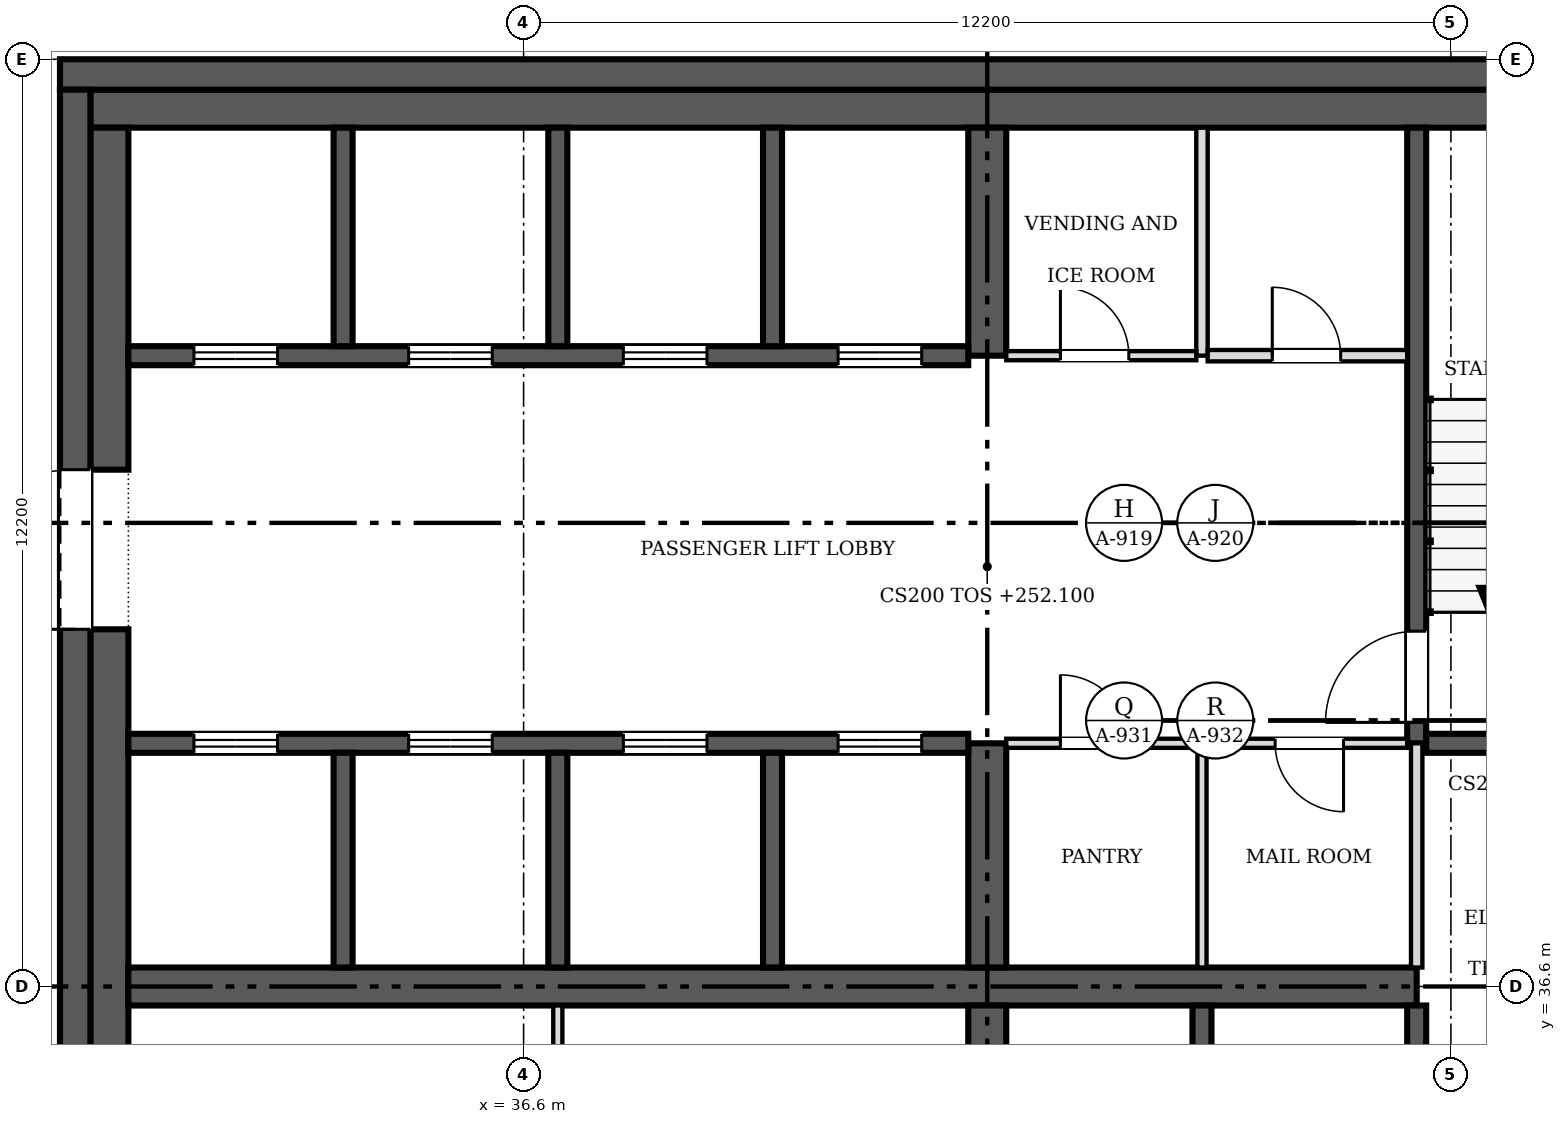
"""IFC4 building model, lengths in metres.
Left out: names, types, materials, properties, quantities, classifications, styles, units other than length and angle.
Written with IfcOpenShell. Run it as: python <this file> out.ifc"""

import sys

from ifc_helpers import new_model, si_unit, direction, frame, frame_2d, origin, place, context, subcontext, project, spatial, rectangle, extrude, source, transform, mapped, element, fill, save


model = new_model("IFC4")
c1 = context("Model", 3, precision=1e-05, world=origin(), true_north=direction((0.0, 1.0)))
c2 = subcontext(c1, "Body", "Model", "MODEL_VIEW")
j1 = project(units=[si_unit("LENGTHUNIT", "METRE"), si_unit("PLANEANGLEUNIT", "RADIAN")], contexts=[c1])
p1 = place(None, origin())
s1 = spatial("IfcSite", under=j1, at=p1, CompositionType="ELEMENT")
p2 = place(p1, origin())
s2 = spatial("IfcBuilding", under=s1, at=p2, CompositionType="ELEMENT")
p3 = place(p2, frame((0.0, 0.0, 252.1)))
s3 = spatial("IfcBuildingStorey", under=s2, at=p3, CompositionType="ELEMENT", Elevation=252.1)
p4 = place(p3, frame((30.7, 24.8, 0.0), z_axis=(0.0, 0.0, 1.0), x_axis=(0.0, 1.0, 0.0)))
e1 = element("IfcWall", 1, at=p4, inside=s3, PredefinedType="SHEAR", context=c2, shape_type="SweptSolid", body=[
    extrude(rectangle(XDim=23.6, YDim=0.4, at=frame_2d((11.8, 0.0))), origin(), (0.0, 0.0, 1.0), 3.8),
])
m1 = source(origin(), c2, "Body", "SweptSolid", [
    extrude(rectangle(XDim=2.1, YDim=2.4, at=frame_2d((1.05, 1.2))), frame((0.0, 0.21, 0.0), z_axis=(0.0, -1.0, 0.0), x_axis=(1.0, 0.0, 0.0)), (0.0, 0.0, 1.0), 0.42),
])
p5 = place(p4, frame((5.0, 0.0, 0.0)))
e2 = element("IfcOpeningElement", 2, at=p5, cuts=e1, PredefinedType="OPENING", context=c2, shape_type="MappedRepresentation", body=[
    mapped(m1, transform((0.0, 0.0, 0.0), scale=1.0)),
])
p6 = place(p4, frame((16.5, 0.0, 0.0)))
e3 = element("IfcOpeningElement", 3, at=p6, cuts=e1, PredefinedType="OPENING", context=c2, shape_type="MappedRepresentation", body=[
    mapped(m1, transform((0.0, 0.0, 0.0), scale=1.0)),
])
p7 = place(p3, frame((30.5, 48.6, 0.0), z_axis=(0.0, 0.0, 1.0), x_axis=(1.0, 0.0, 0.0)))
e4 = element("IfcWall", 4, at=p7, inside=s3, PredefinedType="SHEAR", context=c2, shape_type="SweptSolid", body=[
    extrude(rectangle(XDim=24.4, YDim=0.4, at=frame_2d((12.2, 0.0))), origin(), (0.0, 0.0, 1.0), 3.8),
])
p8 = place(p3, frame((30.9, 48.15, 0.0), z_axis=(0.0, 0.0, 1.0), x_axis=(1.0, 0.0, 0.0)))
e5 = element("IfcWall", 5, at=p8, inside=s3, PredefinedType="SOLIDWALL", context=c2, shape_type="SweptSolid", body=[
    extrude(rectangle(XDim=23.6, YDim=0.5, at=frame_2d((11.8, 0.0))), origin(), (0.0, 0.0, 1.0), 3.8),
])
p9 = place(p3, frame((31.15, 31.9, 0.0), z_axis=(0.0, 0.0, 1.0), x_axis=(0.0, 1.0, 0.0)))
e6 = element("IfcWall", 6, at=p9, inside=s3, PredefinedType="SOLIDWALL", context=c2, shape_type="SweptSolid", body=[
    extrude(rectangle(XDim=9.4, YDim=0.5, at=frame_2d((4.7, 0.0))), origin(), (0.0, 0.0, 1.0), 3.8),
])
p10 = place(p3, frame((31.15, 43.4, 0.0), z_axis=(0.0, 0.0, 1.0), x_axis=(0.0, 1.0, 0.0)))
e7 = element("IfcWall", 7, at=p10, inside=s3, PredefinedType="SOLIDWALL", context=c2, shape_type="SweptSolid", body=[
    extrude(rectangle(XDim=4.5, YDim=0.5, at=frame_2d((2.25, 0.0))), origin(), (0.0, 0.0, 1.0), 3.8),
])
p11 = place(p3, frame((31.4, 36.6, 0.0), z_axis=(0.0, 0.0, 1.0), x_axis=(1.0, 0.0, 0.0)))
e8 = element("IfcWall", 8, at=p11, inside=s3, PredefinedType="SHEAR", context=c2, shape_type="SweptSolid", body=[
    extrude(rectangle(XDim=16.95, YDim=0.5, at=frame_2d((8.475, 0.0))), origin(), (0.0, 0.0, 1.0), 3.8),
])
p12 = place(p3, frame((42.7, 36.35, 0.0), z_axis=(0.0, 0.0, 1.0), x_axis=(0.0, -1.0, 0.0)))
e9 = element("IfcWall", 9, at=p12, inside=s3, PredefinedType="SHEAR", context=c2, shape_type="SweptSolid", body=[
    extrude(rectangle(XDim=11.05, YDim=0.5, at=frame_2d((5.525, 0.0))), origin(), (0.0, 0.0, 1.0), 3.8),
])
m2 = source(origin(), c2, "Body", "SweptSolid", [
    extrude(rectangle(XDim=0.9, YDim=2.1, at=frame_2d((0.45, 1.05))), frame((0.0, 0.26, 0.0), z_axis=(0.0, -1.0, 0.0), x_axis=(1.0, 0.0, 0.0)), (0.0, 0.0, 1.0), 0.52),
])
p13 = place(p12, frame((6.5, 0.0, 0.0)))
e10 = element("IfcOpeningElement", 10, at=p13, cuts=e9, PredefinedType="OPENING", context=c2, shape_type="MappedRepresentation", body=[
    mapped(m2, transform((0.0, 0.0, 0.0), scale=1.0)),
])
m3 = source(origin(), c2, "Body", "SweptSolid", [
    extrude(rectangle(XDim=1.1, YDim=2.1, at=frame_2d((0.55, 1.05))), frame((0.0, 0.26, 0.0), z_axis=(0.0, -1.0, 0.0), x_axis=(1.0, 0.0, 0.0)), (0.0, 0.0, 1.0), 0.52),
])
p14 = place(p12, frame((3.8, 0.0, 0.0)))
e11 = element("IfcOpeningElement", 11, at=p14, cuts=e9, PredefinedType="OPENING", context=c2, shape_type="MappedRepresentation", body=[
    mapped(m3, transform((0.0, 0.0, 0.0), scale=1.0)),
])
p15 = place(p3, frame((42.7, 36.85, 0.0), z_axis=(0.0, 0.0, 1.0), x_axis=(0.0, 1.0, 0.0)))
e12 = element("IfcWall", 12, at=p15, inside=s3, PredefinedType="SHEAR", context=c2, shape_type="SweptSolid", body=[
    extrude(rectangle(XDim=2.95, YDim=0.5, at=frame_2d((1.475, 0.0))), origin(), (0.0, 0.0, 1.0), 3.8),
])
p16 = place(p3, frame((42.7, 44.9, 0.0), z_axis=(0.0, 0.0, 1.0), x_axis=(0.0, 1.0, 0.0)))
e13 = element("IfcWall", 13, at=p16, inside=s3, PredefinedType="SHEAR", context=c2, shape_type="SweptSolid", body=[
    extrude(rectangle(XDim=3.0, YDim=0.5, at=frame_2d((1.5, 0.0))), origin(), (0.0, 0.0, 1.0), 3.8),
])
p17 = place(p3, frame((31.4, 39.8, 0.0), z_axis=(0.0, 0.0, 1.0), x_axis=(1.0, 0.0, 0.0)))
e14 = element("IfcWall", 14, at=p17, inside=s3, PredefinedType="SOLIDWALL", context=c2, shape_type="SweptSolid", body=[
    extrude(rectangle(XDim=11.05, YDim=0.25, at=frame_2d((5.525, 0.0))), origin(), (0.0, 0.0, 1.0), 3.8),
])
m4 = source(origin(), c2, "Body", "SweptSolid", [
    extrude(rectangle(XDim=1.1, YDim=2.1, at=frame_2d((0.55, 1.05))), frame((0.0, 0.135, 0.0), z_axis=(0.0, -1.0, 0.0), x_axis=(1.0, 0.0, 0.0)), (0.0, 0.0, 1.0), 0.27),
])
p18 = place(p17, frame((0.863, 0.0, 0.0)))
e15 = element("IfcOpeningElement", 15, at=p18, cuts=e14, PredefinedType="OPENING", context=c2, shape_type="MappedRepresentation", body=[
    mapped(m4, transform((0.0, 0.0, 0.0), scale=1.0)),
])
p19 = place(p17, frame((3.688, 0.0, 0.0)))
e16 = element("IfcOpeningElement", 16, at=p19, cuts=e14, PredefinedType="OPENING", context=c2, shape_type="MappedRepresentation", body=[
    mapped(m4, transform((0.0, 0.0, 0.0), scale=1.0)),
])
p20 = place(p17, frame((6.512, 0.0, 0.0)))
e17 = element("IfcOpeningElement", 17, at=p20, cuts=e14, PredefinedType="OPENING", context=c2, shape_type="MappedRepresentation", body=[
    mapped(m4, transform((0.0, 0.0, 0.0), scale=1.0)),
])
p21 = place(p17, frame((9.337, 0.0, 0.0)))
e18 = element("IfcOpeningElement", 18, at=p21, cuts=e14, PredefinedType="OPENING", context=c2, shape_type="MappedRepresentation", body=[
    mapped(m4, transform((0.0, 0.0, 0.0), scale=1.0)),
])
p22 = place(p3, frame((42.45, 44.9, 0.0), z_axis=(0.0, 0.0, 1.0), x_axis=(-1.0, 0.0, 0.0)))
e19 = element("IfcWall", 19, at=p22, inside=s3, PredefinedType="SOLIDWALL", context=c2, shape_type="SweptSolid", body=[
    extrude(rectangle(XDim=11.05, YDim=0.25, at=frame_2d((5.525, 0.0))), origin(), (0.0, 0.0, 1.0), 3.8),
])
p23 = place(p22, frame((9.087, 0.0, 0.0)))
e20 = element("IfcOpeningElement", 20, at=p23, cuts=e19, PredefinedType="OPENING", context=c2, shape_type="MappedRepresentation", body=[
    mapped(m4, transform((0.0, 0.0, 0.0), scale=1.0)),
])
p24 = place(p22, frame((6.262, 0.0, 0.0)))
e21 = element("IfcOpeningElement", 21, at=p24, cuts=e19, PredefinedType="OPENING", context=c2, shape_type="MappedRepresentation", body=[
    mapped(m4, transform((0.0, 0.0, 0.0), scale=1.0)),
])
p25 = place(p22, frame((3.438, 0.0, 0.0)))
e22 = element("IfcOpeningElement", 22, at=p25, cuts=e19, PredefinedType="OPENING", context=c2, shape_type="MappedRepresentation", body=[
    mapped(m4, transform((0.0, 0.0, 0.0), scale=1.0)),
])
p26 = place(p22, frame((0.613, 0.0, 0.0)))
e23 = element("IfcOpeningElement", 23, at=p26, cuts=e19, PredefinedType="OPENING", context=c2, shape_type="MappedRepresentation", body=[
    mapped(m4, transform((0.0, 0.0, 0.0), scale=1.0)),
])
p27 = place(p3, frame((48.35, 36.35, 0.0), z_axis=(0.0, 0.0, 1.0), x_axis=(0.0, -1.0, 0.0)))
e24 = element("IfcWall", 24, at=p27, inside=s3, PredefinedType="SOLIDWALL", context=c2, shape_type="SweptSolid", body=[
    extrude(rectangle(XDim=11.05, YDim=0.25, at=frame_2d((5.525, 0.0))), origin(), (0.0, 0.0, 1.0), 3.8),
])
m5 = source(origin(), c2, "Body", "SweptSolid", [
    extrude(rectangle(XDim=1.2, YDim=2.1, at=frame_2d((0.6, 1.05))), frame((0.0, 0.135, 0.0), z_axis=(0.0, -1.0, 0.0), x_axis=(1.0, 0.0, 0.0)), (0.0, 0.0, 1.0), 0.27),
])
p28 = place(p27, frame((3.225, 0.0, 0.0)))
e25 = element("IfcOpeningElement", 25, at=p28, cuts=e24, PredefinedType="OPENING", context=c2, shape_type="MappedRepresentation", body=[
    mapped(m5, transform((0.0, 0.0, 0.0), scale=1.0)),
])
p29 = place(p3, frame((48.35, 47.9, 0.0), z_axis=(0.0, 0.0, 1.0), x_axis=(0.0, -1.0, 0.0)))
e26 = element("IfcWall", 26, at=p29, inside=s3, PredefinedType="SOLIDWALL", context=c2, shape_type="SweptSolid", body=[
    extrude(rectangle(XDim=8.1, YDim=0.25, at=frame_2d((4.05, 0.0))), origin(), (0.0, 0.0, 1.0), 3.8),
])
p30 = place(p29, frame((6.625, 0.0, 0.0)))
e27 = element("IfcOpeningElement", 27, at=p30, cuts=e26, PredefinedType="OPENING", context=c2, shape_type="MappedRepresentation", body=[
    mapped(m5, transform((0.0, 0.0, 0.0), scale=1.0)),
])
p31 = place(p3, frame((48.475, 39.8, 0.0), z_axis=(0.0, 0.0, 1.0), x_axis=(1.0, 0.0, 0.0)))
e28 = element("IfcWall", 28, at=p31, inside=s3, PredefinedType="SOLIDWALL", context=c2, shape_type="SweptSolid", body=[
    extrude(rectangle(XDim=3.4, YDim=0.25, at=frame_2d((1.7, 0.0))), origin(), (0.0, 0.0, 1.0), 3.8),
])
for number, where, z_axis, x_axis in (
    (29, (34.225, 36.85, 0.0), (0.0, 0.0, 1.0), (0.0, 1.0, 0.0)),
    (30, (37.05, 36.85, 0.0), (0.0, 0.0, 1.0), (0.0, 1.0, 0.0)),
    (31, (39.875, 36.85, 0.0), (0.0, 0.0, 1.0), (0.0, 1.0, 0.0)),
):
    element("IfcWall", number, at=place(p3, frame(where, z_axis=z_axis, x_axis=x_axis)), inside=s3, PredefinedType="SOLIDWALL", context=c2, shape_type="SweptSolid", body=[
        extrude(rectangle(XDim=2.825, YDim=0.25, at=frame_2d((1.413, 0.0))), origin(), (0.0, 0.0, 1.0), 3.8),
    ])
p32 = place(p3, frame((45.525, 33.525, 0.0), z_axis=(0.0, 0.0, 1.0), x_axis=(0.0, 1.0, 0.0)))
e32 = element("IfcWall", 32, at=p32, inside=s3, PredefinedType="SOLIDWALL", context=c2, shape_type="SweptSolid", body=[
    extrude(rectangle(XDim=2.825, YDim=0.25, at=frame_2d((1.413, 0.0))), origin(), (0.0, 0.0, 1.0), 3.8),
])
for number, where, z_axis, x_axis in (
    (33, (34.225, 45.025, 0.0), (0.0, 0.0, 1.0), (0.0, 1.0, 0.0)),
    (34, (37.05, 45.025, 0.0), (0.0, 0.0, 1.0), (0.0, 1.0, 0.0)),
    (35, (39.875, 45.025, 0.0), (0.0, 0.0, 1.0), (0.0, 1.0, 0.0)),
):
    element("IfcWall", number, at=place(p3, frame(where, z_axis=z_axis, x_axis=x_axis)), inside=s3, PredefinedType="SOLIDWALL", context=c2, shape_type="SweptSolid", body=[
        extrude(rectangle(XDim=2.875, YDim=0.25, at=frame_2d((1.438, 0.0))), origin(), (0.0, 0.0, 1.0), 3.8),
    ])
p33 = place(p3, frame((48.225, 39.8, 0.0), z_axis=(0.0, 0.0, 1.0), x_axis=(-1.0, 0.0, 0.0)))
e36 = element("IfcWall", 36, at=p33, inside=s3, PredefinedType="PARTITIONING", context=c2, shape_type="SweptSolid", body=[
    extrude(rectangle(XDim=5.275, YDim=0.12, at=frame_2d((2.638, 0.0))), origin(), (0.0, 0.0, 1.0), 3.6),
])
m6 = source(origin(), c2, "Body", "SweptSolid", [
    extrude(rectangle(XDim=0.9, YDim=2.1, at=frame_2d((0.45, 1.05))), frame((0.0, 0.07, 0.0), z_axis=(0.0, -1.0, 0.0), x_axis=(1.0, 0.0, 0.0)), (0.0, 0.0, 1.0), 0.14),
])
p34 = place(p33, frame((3.663, 0.0, 0.0)))
e37 = element("IfcOpeningElement", 37, at=p34, cuts=e36, PredefinedType="OPENING", context=c2, shape_type="MappedRepresentation", body=[
    mapped(m6, transform((0.0, 0.0, 0.0), scale=1.0)),
])
p35 = place(p33, frame((0.837, 0.0, 0.0)))
e38 = element("IfcOpeningElement", 38, at=p35, cuts=e36, PredefinedType="OPENING", context=c2, shape_type="MappedRepresentation", body=[
    mapped(m6, transform((0.0, 0.0, 0.0), scale=1.0)),
])
p36 = place(p3, frame((45.525, 36.85, 0.0), z_axis=(0.0, 0.0, 1.0), x_axis=(0.0, 1.0, 0.0)))
e39 = element("IfcWall", 39, at=p36, inside=s3, PredefinedType="PARTITIONING", context=c2, shape_type="SweptSolid", body=[
    extrude(rectangle(XDim=2.89, YDim=0.12, at=frame_2d((1.445, 0.0))), origin(), (0.0, 0.0, 1.0), 3.6),
])
p37 = place(p3, frame((48.35, 36.85, 0.0), z_axis=(0.0, 0.0, 1.0), x_axis=(0.0, 1.0, 0.0)))
e40 = element("IfcWall", 40, at=p37, inside=s3, PredefinedType="PARTITIONING", context=c2, shape_type="SweptSolid", body=[
    extrude(rectangle(XDim=2.95, YDim=0.15, at=frame_2d((1.475, 0.0))), origin(), (0.0, 0.0, 1.0), 3.6),
])
p38 = place(p3, frame((37.05, 33.46, 0.0), z_axis=(0.0, 0.0, 1.0), x_axis=(0.0, 1.0, 0.0)))
e41 = element("IfcWall", 41, at=p38, inside=s3, PredefinedType="PARTITIONING", context=c2, shape_type="SweptSolid", body=[
    extrude(rectangle(XDim=2.89, YDim=0.12, at=frame_2d((1.445, 0.0))), origin(), (0.0, 0.0, 1.0), 3.6),
])
p39 = place(p3, frame((45.525, 44.9, 0.0), z_axis=(0.0, 0.0, 1.0), x_axis=(0.0, 1.0, 0.0)))
e42 = element("IfcWall", 42, at=p39, inside=s3, PredefinedType="PARTITIONING", context=c2, shape_type="SweptSolid", body=[
    extrude(rectangle(XDim=3.0, YDim=0.15, at=frame_2d((1.5, 0.0))), origin(), (0.0, 0.0, 1.0), 3.6),
])
p40 = place(p3, frame((42.95, 44.9, 0.0), z_axis=(0.0, 0.0, 1.0), x_axis=(1.0, 0.0, 0.0)))
e43 = element("IfcWall", 43, at=p40, inside=s3, PredefinedType="PARTITIONING", context=c2, shape_type="SweptSolid", body=[
    extrude(rectangle(XDim=2.5, YDim=0.12, at=frame_2d((1.25, 0.0))), origin(), (0.0, 0.0, 1.0), 3.6),
])
p41 = place(p40, frame((0.712, 0.0, 0.0)))
e44 = element("IfcOpeningElement", 44, at=p41, cuts=e43, PredefinedType="OPENING", context=c2, shape_type="MappedRepresentation", body=[
    mapped(m6, transform((0.0, 0.0, 0.0), scale=1.0)),
])
p42 = place(p3, frame((45.6, 44.9, 0.0), z_axis=(0.0, 0.0, 1.0), x_axis=(1.0, 0.0, 0.0)))
e45 = element("IfcWall", 45, at=p42, inside=s3, PredefinedType="PARTITIONING", context=c2, shape_type="SweptSolid", body=[
    extrude(rectangle(XDim=2.625, YDim=0.15, at=frame_2d((1.312, 0.0))), origin(), (0.0, 0.0, 1.0), 3.6),
])
m7 = source(origin(), c2, "Body", "SweptSolid", [
    extrude(rectangle(XDim=0.9, YDim=2.1, at=frame_2d((0.45, 1.05))), frame((0.0, 0.085, 0.0), z_axis=(0.0, -1.0, 0.0), x_axis=(1.0, 0.0, 0.0)), (0.0, 0.0, 1.0), 0.17),
])
p43 = place(p42, frame((0.85, 0.0, 0.0)))
e46 = element("IfcOpeningElement", 46, at=p43, cuts=e45, PredefinedType="OPENING", context=c2, shape_type="MappedRepresentation", body=[
    mapped(m7, transform((0.0, 0.0, 0.0), scale=1.0)),
])
m8 = source(origin(), c2, "Body", "SweptSolid", [
    extrude(rectangle(XDim=2.1, YDim=2.4, at=frame_2d((1.05, 1.2))), frame((0.0, 0.025, 0.0), z_axis=(0.0, -1.0, 0.0), x_axis=(1.0, 0.0, 0.0)), (0.0, 0.0, 1.0), 0.05),
])
p44 = place(p6, origin())
e47 = element("IfcDoor", 47, at=p44, inside=s3, OperationType="DOUBLE_DOOR_SINGLE_SWING", PredefinedType="DOOR", context=c2, shape_type="MappedRepresentation", body=[
    mapped(m8, transform((0.0, 0.0, 0.0), scale=1.0)),
])
fill(e3, e47)
m9 = source(origin(), c2, "Body", "SweptSolid", [
    extrude(rectangle(XDim=1.1, YDim=2.1, at=frame_2d((0.55, 1.05))), frame((0.0, 0.025, 0.0), z_axis=(0.0, -1.0, 0.0), x_axis=(1.0, 0.0, 0.0)), (0.0, 0.0, 1.0), 0.05),
])
p45 = place(p18, origin())
e48 = element("IfcDoor", 48, at=p45, inside=s3, OperationType="DOUBLE_DOOR_SLIDING", PredefinedType="DOOR", context=c2, shape_type="MappedRepresentation", body=[
    mapped(m9, transform((0.0, 0.0, 0.0), scale=1.0)),
])
fill(e15, e48)
p46 = place(p19, origin())
e49 = element("IfcDoor", 49, at=p46, inside=s3, OperationType="DOUBLE_DOOR_SLIDING", PredefinedType="DOOR", context=c2, shape_type="MappedRepresentation", body=[
    mapped(m9, transform((0.0, 0.0, 0.0), scale=1.0)),
])
fill(e16, e49)
p47 = place(p20, origin())
e50 = element("IfcDoor", 50, at=p47, inside=s3, OperationType="DOUBLE_DOOR_SLIDING", PredefinedType="DOOR", context=c2, shape_type="MappedRepresentation", body=[
    mapped(m9, transform((0.0, 0.0, 0.0), scale=1.0)),
])
fill(e17, e50)
p48 = place(p21, origin())
e51 = element("IfcDoor", 51, at=p48, inside=s3, OperationType="DOUBLE_DOOR_SLIDING", PredefinedType="DOOR", context=c2, shape_type="MappedRepresentation", body=[
    mapped(m9, transform((0.0, 0.0, 0.0), scale=1.0)),
])
fill(e18, e51)
p49 = place(p23, origin())
e52 = element("IfcDoor", 52, at=p49, inside=s3, OperationType="DOUBLE_DOOR_SLIDING", PredefinedType="DOOR", context=c2, shape_type="MappedRepresentation", body=[
    mapped(m9, transform((0.0, 0.0, 0.0), scale=1.0)),
])
fill(e20, e52)
p50 = place(p24, origin())
e53 = element("IfcDoor", 53, at=p50, inside=s3, OperationType="DOUBLE_DOOR_SLIDING", PredefinedType="DOOR", context=c2, shape_type="MappedRepresentation", body=[
    mapped(m9, transform((0.0, 0.0, 0.0), scale=1.0)),
])
fill(e21, e53)
p51 = place(p25, origin())
e54 = element("IfcDoor", 54, at=p51, inside=s3, OperationType="DOUBLE_DOOR_SLIDING", PredefinedType="DOOR", context=c2, shape_type="MappedRepresentation", body=[
    mapped(m9, transform((0.0, 0.0, 0.0), scale=1.0)),
])
fill(e22, e54)
p52 = place(p26, origin())
e55 = element("IfcDoor", 55, at=p52, inside=s3, OperationType="DOUBLE_DOOR_SLIDING", PredefinedType="DOOR", context=c2, shape_type="MappedRepresentation", body=[
    mapped(m9, transform((0.0, 0.0, 0.0), scale=1.0)),
])
fill(e23, e55)
m10 = source(origin(), c2, "Body", "SweptSolid", [
    extrude(rectangle(XDim=1.2, YDim=2.1, at=frame_2d((0.6, 1.05))), frame((0.0, 0.025, 0.0), z_axis=(0.0, -1.0, 0.0), x_axis=(1.0, 0.0, 0.0)), (0.0, 0.0, 1.0), 0.05),
])
p53 = place(p30, origin())
e56 = element("IfcDoor", 56, at=p53, inside=s3, OperationType="SINGLE_SWING_RIGHT", PredefinedType="DOOR", context=c2, shape_type="MappedRepresentation", body=[
    mapped(m10, transform((0.0, 0.0, 0.0), scale=1.0)),
])
fill(e27, e56)
m11 = source(origin(), c2, "Body", "SweptSolid", [
    extrude(rectangle(XDim=0.9, YDim=2.1, at=frame_2d((0.45, 1.05))), frame((0.0, 0.025, 0.0), z_axis=(0.0, -1.0, 0.0), x_axis=(1.0, 0.0, 0.0)), (0.0, 0.0, 1.0), 0.05),
])
p54 = place(p34, origin())
e57 = element("IfcDoor", 57, at=p54, inside=s3, OperationType="SINGLE_SWING_RIGHT", PredefinedType="DOOR", context=c2, shape_type="MappedRepresentation", body=[
    mapped(m11, transform((0.0, 0.0, 0.0), scale=1.0)),
])
fill(e37, e57)
p55 = place(p35, origin())
e58 = element("IfcDoor", 58, at=p55, inside=s3, OperationType="SINGLE_SWING_LEFT", PredefinedType="DOOR", context=c2, shape_type="MappedRepresentation", body=[
    mapped(m11, transform((0.0, 0.0, 0.0), scale=1.0)),
])
fill(e38, e58)
p56 = place(p41, origin())
e59 = element("IfcDoor", 59, at=p56, inside=s3, OperationType="SINGLE_SWING_LEFT", PredefinedType="DOOR", context=c2, shape_type="MappedRepresentation", body=[
    mapped(m11, transform((0.0, 0.0, 0.0), scale=1.0)),
])
fill(e44, e59)
p57 = place(p43, origin())
e60 = element("IfcDoor", 60, at=p57, inside=s3, OperationType="SINGLE_SWING_LEFT", PredefinedType="DOOR", context=c2, shape_type="MappedRepresentation", body=[
    mapped(m11, transform((0.0, 0.0, 0.0), scale=1.0)),
])
fill(e46, e60)
save(model, sys.argv[1])
